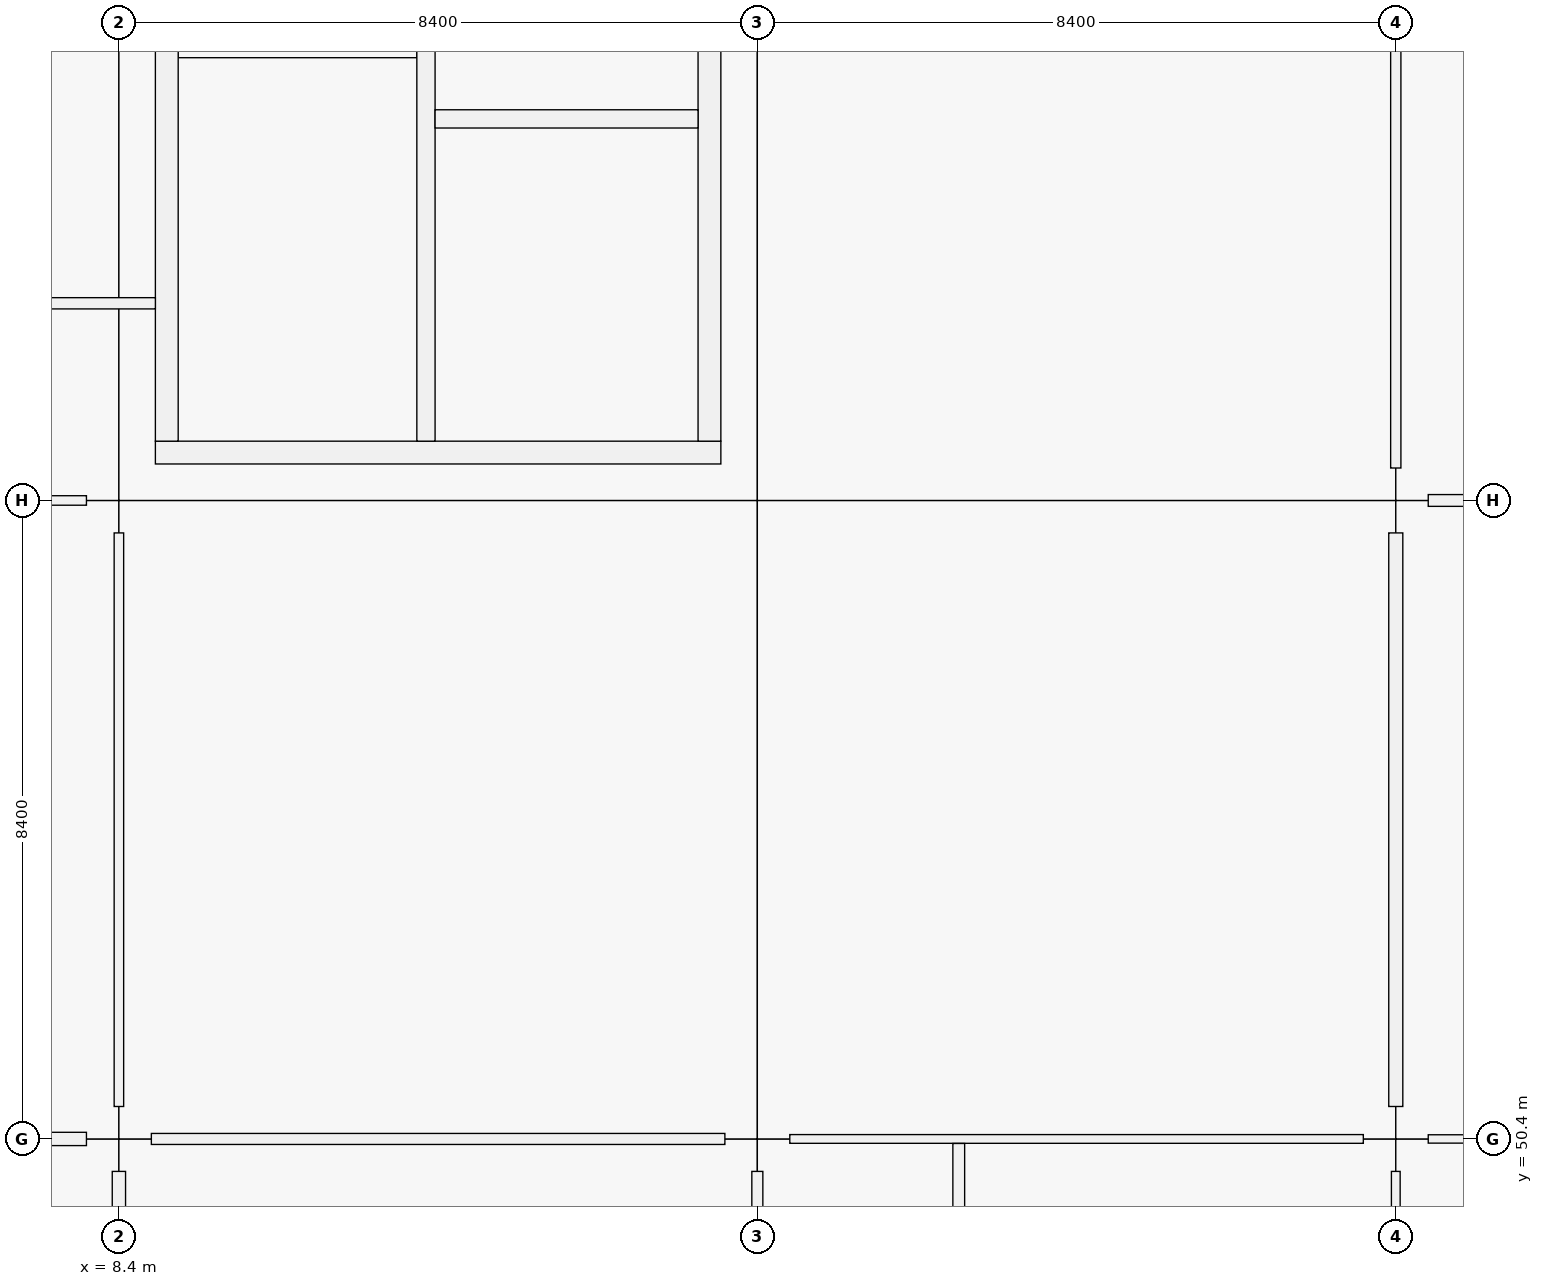
"""IFC4 building model, lengths in metres.
Left out: names, types, materials, properties, quantities, classifications, styles, units other than length and angle.
Written with IfcOpenShell. Run it as: python <this file> out.ifc"""

import sys

from ifc_helpers import new_model, si_unit, direction, frame, frame_2d, origin, origin_2d, place, context, subcontext, project, spatial, rectangle, extrude, element, fill, save


model = new_model("IFC4")
c1 = context("Model", 3, precision=1e-05, world=origin(), true_north=direction((0.0, 1.0)))
c2 = subcontext(c1, "Body", "Model", "MODEL_VIEW")
j1 = project(units=[si_unit("LENGTHUNIT", "METRE"), si_unit("PLANEANGLEUNIT", "RADIAN")], contexts=[c1])
p1 = place(None, origin())
s1 = spatial("IfcSite", under=j1, at=p1, CompositionType="ELEMENT")
p2 = place(p1, origin())
s2 = spatial("IfcBuilding", under=s1, at=p2, CompositionType="ELEMENT")
p3 = place(p2, origin())
s3 = spatial("IfcBuildingStorey", under=s2, at=p3, CompositionType="ELEMENT", Elevation=0.0)
for number, where, z_axis, x_axis in (
    (1, (8.4, 50.4, 0.0), (0.0, 0.0, 1.0), (1.0, 0.0, 0.0)),
    (2, (8.4, 58.8, 0.0), (0.0, 0.0, 1.0), (1.0, 0.0, 0.0)),
    (3, (16.8, 50.4, 0.0), (0.0, 0.0, 1.0), (1.0, 0.0, 0.0)),
    (4, (16.8, 58.8, 0.0), (0.0, 0.0, 1.0), (1.0, 0.0, 0.0)),
    (5, (25.2, 50.4, 0.0), (0.0, 0.0, 1.0), (1.0, 0.0, 0.0)),
    (6, (25.2, 58.8, 0.0), (0.0, 0.0, 1.0), (1.0, 0.0, 0.0)),
):
    element("IfcColumn", number, at=place(p3, frame(where, z_axis=z_axis, x_axis=x_axis)), inside=s3, PredefinedType="COLUMN", context=c2, shape_type="SweptSolid", body=[
        extrude(rectangle(XDim=0.85, YDim=0.85, at=origin_2d()), origin(), (0.0, 0.0, 1.0), 5.76),
    ])
p4 = place(p3, frame((16.32, 59.43, 0.0), z_axis=(0.0, 0.0, 1.0), x_axis=(-1.0, 0.0, 0.0)))
e7 = element("IfcWall", 7, at=p4, inside=s3, PredefinedType="SHEAR", context=c2, shape_type="SweptSolid", body=[
    extrude(rectangle(XDim=7.44, YDim=0.3, at=frame_2d((3.72, 0.0))), origin(), (0.0, 0.0, 1.0), 5.76),
])
p5 = place(p4, frame((1.28, 0.0, 0.0)))
e8 = element("IfcOpeningElement", 8, at=p5, cuts=e7, PredefinedType="OPENING", context=c2, shape_type="SweptSolid", body=[
    extrude(rectangle(XDim=1.5, YDim=2.15, at=frame_2d((0.75, 1.075))), frame((0.0, 0.15, 0.0), z_axis=(0.0, -1.0, 0.0), x_axis=(1.0, 0.0, 0.0)), (0.0, 0.0, 1.0), 0.3),
])
p6 = place(p3, frame((9.03, 59.58, 0.0), z_axis=(0.0, 0.0, 1.0), x_axis=(0.0, 1.0, 0.0)))
e9 = element("IfcWall", 9, at=p6, inside=s3, PredefinedType="SHEAR", context=c2, shape_type="SweptSolid", body=[
    extrude(rectangle(XDim=6.84, YDim=0.3, at=frame_2d((3.42, 0.0))), origin(), (0.0, 0.0, 1.0), 5.76),
])
p7 = place(p6, frame((0.12, 0.0, 0.0)))
e10 = element("IfcOpeningElement", 10, at=p7, cuts=e9, PredefinedType="OPENING", context=c2, shape_type="SweptSolid", body=[
    extrude(rectangle(XDim=1.0, YDim=2.15, at=frame_2d((0.5, 1.075))), frame((0.0, 0.15, 0.0), z_axis=(0.0, -1.0, 0.0), x_axis=(1.0, 0.0, 0.0)), (0.0, 0.0, 1.0), 0.3),
])
p8 = place(p3, frame((16.17, 66.42, 0.0), z_axis=(0.0, 0.0, 1.0), x_axis=(0.0, -1.0, 0.0)))
e11 = element("IfcWall", 11, at=p8, inside=s3, PredefinedType="SHEAR", context=c2, shape_type="SweptSolid", body=[
    extrude(rectangle(XDim=6.84, YDim=0.3, at=frame_2d((3.42, 0.0))), origin(), (0.0, 0.0, 1.0), 5.76),
])
p9 = place(p3, frame((12.44, 59.58, 0.0), z_axis=(0.0, 0.0, 1.0), x_axis=(0.0, 1.0, 0.0)))
e12 = element("IfcWall", 12, at=p9, inside=s3, PredefinedType="SHEAR", context=c2, shape_type="SweptSolid", body=[
    extrude(rectangle(XDim=6.84, YDim=0.24, at=frame_2d((3.42, 0.0))), origin(), (0.0, 0.0, 1.0), 5.76),
])
p10 = place(p9, frame((0.12, 0.0, 0.0)))
e13 = element("IfcOpeningElement", 13, at=p10, cuts=e12, PredefinedType="OPENING", context=c2, shape_type="SweptSolid", body=[
    extrude(rectangle(XDim=1.0, YDim=2.15, at=frame_2d((0.5, 1.075))), frame((0.0, 0.12, 0.0), z_axis=(0.0, -1.0, 0.0), x_axis=(1.0, 0.0, 0.0)), (0.0, 0.0, 1.0), 0.24),
])
p11 = place(p3, frame((12.56, 63.82, 0.0), z_axis=(0.0, 0.0, 1.0), x_axis=(1.0, 0.0, 0.0)))
e14 = element("IfcWall", 14, at=p11, inside=s3, PredefinedType="SHEAR", context=c2, shape_type="SweptSolid", body=[
    extrude(rectangle(XDim=3.46, YDim=0.24, at=frame_2d((1.73, 0.0))), origin(), (0.0, 0.0, 1.0), 5.76),
])
p12 = place(p11, frame((1.18, 0.0, 0.0)))
e15 = element("IfcOpeningElement", 15, at=p12, cuts=e14, PredefinedType="OPENING", context=c2, shape_type="SweptSolid", body=[
    extrude(rectangle(XDim=1.1, YDim=2.15, at=frame_2d((0.55, 1.075))), frame((0.0, 0.12, 0.0), z_axis=(0.0, -1.0, 0.0), x_axis=(1.0, 0.0, 0.0)), (0.0, 0.0, 1.0), 0.24),
])
p13 = place(p3, frame((0.327, 50.4, 0.0), z_axis=(0.0, 0.0, 1.0), x_axis=(1.0, 0.0, 0.0)))
e16 = element("IfcWall", 16, at=p13, inside=s3, PredefinedType="PARTITIONING", context=c2, shape_type="SweptSolid", body=[
    extrude(rectangle(XDim=7.646, YDim=0.175, at=frame_2d((3.823, 0.0))), origin(), (0.0, 0.0, 1.0), 3.66),
])
p14 = place(p13, frame((3.318, 0.0, 0.0)))
e17 = element("IfcOpeningElement", 17, at=p14, cuts=e16, PredefinedType="OPENING", context=c2, shape_type="SweptSolid", body=[
    extrude(rectangle(XDim=1.01, YDim=2.12, at=frame_2d((0.505, 1.06))), frame((0.0, 0.087, 0.0), z_axis=(0.0, -1.0, 0.0), x_axis=(1.0, 0.0, 0.0)), (0.0, 0.0, 1.0), 0.175),
])
p15 = place(p3, frame((0.302, 58.8, 0.0), z_axis=(0.0, 0.0, 1.0), x_axis=(1.0, 0.0, 0.0)))
e18 = element("IfcWall", 18, at=p15, inside=s3, PredefinedType="PARTITIONING", context=c2, shape_type="SweptSolid", body=[
    extrude(rectangle(XDim=7.671, YDim=0.125, at=frame_2d((3.835, 0.0))), origin(), (0.0, 0.0, 1.0), 3.66),
])
p16 = place(p15, frame((3.316, 0.0, 0.0)))
e19 = element("IfcOpeningElement", 19, at=p16, cuts=e18, PredefinedType="OPENING", context=c2, shape_type="SweptSolid", body=[
    extrude(rectangle(XDim=1.04, YDim=2.2, at=frame_2d((0.52, 1.1))), frame((0.0, 0.062, 0.0), z_axis=(0.0, -1.0, 0.0), x_axis=(1.0, 0.0, 0.0)), (0.0, 0.0, 1.0), 0.125),
])
p17 = place(p3, frame((8.827, 50.4, 0.0), z_axis=(0.0, 0.0, 1.0), x_axis=(1.0, 0.0, 0.0)))
e20 = element("IfcWall", 20, at=p17, inside=s3, PredefinedType="PARTITIONING", context=c2, shape_type="SweptSolid", body=[
    extrude(rectangle(XDim=7.546, YDim=0.145, at=frame_2d((3.773, 0.0))), origin(), (0.0, 0.0, 1.0), 3.66),
])
p18 = place(p17, frame((3.263, 0.0, 0.0)))
e21 = element("IfcOpeningElement", 21, at=p18, cuts=e20, PredefinedType="OPENING", context=c2, shape_type="SweptSolid", body=[
    extrude(rectangle(XDim=1.02, YDim=2.2, at=frame_2d((0.51, 1.1))), frame((0.0, 0.073, 0.0), z_axis=(0.0, -1.0, 0.0), x_axis=(1.0, 0.0, 0.0)), (0.0, 0.0, 1.0), 0.145),
])
p19 = place(p3, frame((17.227, 50.4, 0.0), z_axis=(0.0, 0.0, 1.0), x_axis=(1.0, 0.0, 0.0)))
e22 = element("IfcWall", 22, at=p19, inside=s3, PredefinedType="PARTITIONING", context=c2, shape_type="SweptSolid", body=[
    extrude(rectangle(XDim=7.546, YDim=0.115, at=frame_2d((3.773, 0.0))), origin(), (0.0, 0.0, 1.0), 3.66),
])
p20 = place(p19, frame((0.578, 0.0, 0.0)))
e23 = element("IfcOpeningElement", 23, at=p20, cuts=e22, PredefinedType="OPENING", context=c2, shape_type="SweptSolid", body=[
    extrude(rectangle(XDim=0.92, YDim=2.1, at=frame_2d((0.46, 1.05))), frame((0.0, 0.058, 0.0), z_axis=(0.0, -1.0, 0.0), x_axis=(1.0, 0.0, 0.0)), (0.0, 0.0, 1.0), 0.115),
])
p21 = place(p19, frame((4.468, 0.0, 0.0)))
e24 = element("IfcOpeningElement", 24, at=p21, cuts=e22, PredefinedType="OPENING", context=c2, shape_type="SweptSolid", body=[
    extrude(rectangle(XDim=0.98, YDim=2.08, at=frame_2d((0.49, 1.04))), frame((0.0, 0.058, 0.0), z_axis=(0.0, -1.0, 0.0), x_axis=(1.0, 0.0, 0.0)), (0.0, 0.0, 1.0), 0.115),
])
p22 = place(p3, frame((25.627, 50.4, 0.0), z_axis=(0.0, 0.0, 1.0), x_axis=(1.0, 0.0, 0.0)))
e25 = element("IfcWall", 25, at=p22, inside=s3, PredefinedType="MOVABLE", context=c2, shape_type="SweptSolid", body=[
    extrude(rectangle(XDim=7.546, YDim=0.11, at=frame_2d((3.773, 0.0))), origin(), (0.0, 0.0, 1.0), 3.66),
])
p23 = place(p22, frame((3.233, 0.0, 0.0)))
e26 = element("IfcOpeningElement", 26, at=p23, cuts=e25, PredefinedType="OPENING", context=c2, shape_type="SweptSolid", body=[
    extrude(rectangle(XDim=1.08, YDim=2.25, at=frame_2d((0.54, 1.125))), frame((0.0, 0.055, 0.0), z_axis=(0.0, -1.0, 0.0), x_axis=(1.0, 0.0, 0.0)), (0.0, 0.0, 1.0), 0.11),
])
p24 = place(p3, frame((25.627, 58.8, 0.0), z_axis=(0.0, 0.0, 1.0), x_axis=(1.0, 0.0, 0.0)))
e27 = element("IfcWall", 27, at=p24, inside=s3, PredefinedType="PARTITIONING", context=c2, shape_type="SweptSolid", body=[
    extrude(rectangle(XDim=7.546, YDim=0.155, at=frame_2d((3.773, 0.0))), origin(), (0.0, 0.0, 1.0), 3.66),
])
p25 = place(p24, frame((3.243, 0.0, 0.0)))
e28 = element("IfcOpeningElement", 28, at=p25, cuts=e27, PredefinedType="OPENING", context=c2, shape_type="SweptSolid", body=[
    extrude(rectangle(XDim=1.06, YDim=2.25, at=frame_2d((0.53, 1.125))), frame((0.0, 0.078, 0.0), z_axis=(0.0, -1.0, 0.0), x_axis=(1.0, 0.0, 0.0)), (0.0, 0.0, 1.0), 0.155),
])
p26 = place(p3, frame((8.4, 42.427, 0.0), z_axis=(0.0, 0.0, 1.0), x_axis=(0.0, 1.0, 0.0)))
e29 = element("IfcWall", 29, at=p26, inside=s3, PredefinedType="PARTITIONING", context=c2, shape_type="SweptSolid", body=[
    extrude(rectangle(XDim=7.546, YDim=0.175, at=frame_2d((3.773, 0.0))), origin(), (0.0, 0.0, 1.0), 3.66),
])
p27 = place(p26, frame((3.303, 0.0, 0.0)))
e30 = element("IfcOpeningElement", 30, at=p27, cuts=e29, PredefinedType="OPENING", context=c2, shape_type="SweptSolid", body=[
    extrude(rectangle(XDim=0.94, YDim=2.15, at=frame_2d((0.47, 1.075))), frame((0.0, 0.087, 0.0), z_axis=(0.0, -1.0, 0.0), x_axis=(1.0, 0.0, 0.0)), (0.0, 0.0, 1.0), 0.175),
])
p28 = place(p3, frame((8.4, 50.827, 0.0), z_axis=(0.0, 0.0, 1.0), x_axis=(0.0, 1.0, 0.0)))
e31 = element("IfcWall", 31, at=p28, inside=s3, PredefinedType="PARTITIONING", context=c2, shape_type="SweptSolid", body=[
    extrude(rectangle(XDim=7.546, YDim=0.125, at=frame_2d((3.773, 0.0))), origin(), (0.0, 0.0, 1.0), 3.66),
])
p29 = place(p28, frame((3.263, 0.0, 0.0)))
e32 = element("IfcOpeningElement", 32, at=p29, cuts=e31, PredefinedType="OPENING", context=c2, shape_type="SweptSolid", body=[
    extrude(rectangle(XDim=1.02, YDim=2.2, at=frame_2d((0.51, 1.1))), frame((0.0, 0.062, 0.0), z_axis=(0.0, -1.0, 0.0), x_axis=(1.0, 0.0, 0.0)), (0.0, 0.0, 1.0), 0.125),
])
p30 = place(p3, frame((16.8, 42.427, 0.0), z_axis=(0.0, 0.0, 1.0), x_axis=(0.0, 1.0, 0.0)))
e33 = element("IfcWall", 33, at=p30, inside=s3, PredefinedType="PARTITIONING", context=c2, shape_type="SweptSolid", body=[
    extrude(rectangle(XDim=7.546, YDim=0.145, at=frame_2d((3.773, 0.0))), origin(), (0.0, 0.0, 1.0), 3.66),
])
p31 = place(p3, frame((25.2, 42.427, 0.0), z_axis=(0.0, 0.0, 1.0), x_axis=(0.0, 1.0, 0.0)))
e34 = element("IfcWall", 34, at=p31, inside=s3, PredefinedType="PARTITIONING", context=c2, shape_type="SweptSolid", body=[
    extrude(rectangle(XDim=7.546, YDim=0.115, at=frame_2d((3.773, 0.0))), origin(), (0.0, 0.0, 1.0), 3.66),
])
p32 = place(p3, frame((25.2, 50.827, 0.0), z_axis=(0.0, 0.0, 1.0), x_axis=(0.0, 1.0, 0.0)))
e35 = element("IfcWall", 35, at=p32, inside=s3, PredefinedType="PARTITIONING", context=c2, shape_type="SweptSolid", body=[
    extrude(rectangle(XDim=7.546, YDim=0.185, at=frame_2d((3.773, 0.0))), origin(), (0.0, 0.0, 1.0), 3.66),
])
p33 = place(p32, frame((3.303, 0.0, 0.0)))
e36 = element("IfcOpeningElement", 36, at=p33, cuts=e35, PredefinedType="OPENING", context=c2, shape_type="SweptSolid", body=[
    extrude(rectangle(XDim=0.94, YDim=2.15, at=frame_2d((0.47, 1.075))), frame((0.0, 0.093, 0.0), z_axis=(0.0, -1.0, 0.0), x_axis=(1.0, 0.0, 0.0)), (0.0, 0.0, 1.0), 0.185),
])
p34 = place(p3, frame((25.2, 59.227, 0.0), z_axis=(0.0, 0.0, 1.0), x_axis=(0.0, 1.0, 0.0)))
e37 = element("IfcWall", 37, at=p34, inside=s3, PredefinedType="PARTITIONING", context=c2, shape_type="SweptSolid", body=[
    extrude(rectangle(XDim=7.546, YDim=0.135, at=frame_2d((3.773, 0.0))), origin(), (0.0, 0.0, 1.0), 3.66),
])
p35 = place(p34, frame((3.313, 0.0, 0.0)))
e38 = element("IfcOpeningElement", 38, at=p35, cuts=e37, PredefinedType="OPENING", context=c2, shape_type="SweptSolid", body=[
    extrude(rectangle(XDim=0.92, YDim=2.15, at=frame_2d((0.46, 1.075))), frame((0.0, 0.067, 0.0), z_axis=(0.0, -1.0, 0.0), x_axis=(1.0, 0.0, 0.0)), (0.0, 0.0, 1.0), 0.135),
])
p36 = place(p3, frame((19.45, 42.084, 0.0), z_axis=(0.0, 0.0, 1.0), x_axis=(0.0, 1.0, 0.0)))
e39 = element("IfcWall", 39, at=p36, inside=s3, PredefinedType="PARTITIONING", context=c2, shape_type="SweptSolid", body=[
    extrude(rectangle(XDim=8.256, YDim=0.155, at=frame_2d((4.128, 0.0))), origin(), (0.0, 0.0, 1.0), 3.66),
])
p37 = place(p3, frame((0.16, 61.394, 0.0), z_axis=(0.0, 0.0, 1.0), x_axis=(1.0, 0.0, 0.0)))
e40 = element("IfcWall", 40, at=p37, inside=s3, PredefinedType="PARTITIONING", context=c2, shape_type="SweptSolid", body=[
    extrude(rectangle(XDim=8.72, YDim=0.148, at=frame_2d((4.36, 0.0))), origin(), (0.0, 0.0, 1.0), 3.66),
])
p38 = place(p10, origin())
e41 = element("IfcDoor", 41, at=p38, inside=s3, OperationType="SINGLE_SWING_LEFT", PredefinedType="DOOR", context=c2, shape_type="SweptSolid", body=[
    extrude(rectangle(XDim=1.0, YDim=2.15, at=frame_2d((0.5, 1.075))), frame((0.0, 0.025, 0.0), z_axis=(0.0, -1.0, 0.0), x_axis=(1.0, 0.0, 0.0)), (0.0, 0.0, 1.0), 0.05),
])
fill(e13, e41)
p39 = place(p5, origin())
e42 = element("IfcDoor", 42, at=p39, inside=s3, OperationType="DOUBLE_DOOR_SINGLE_SWING", PredefinedType="DOOR", context=c2, shape_type="SweptSolid", body=[
    extrude(rectangle(XDim=1.5, YDim=2.15, at=frame_2d((0.75, 1.075))), frame((0.0, 0.025, 0.0), z_axis=(0.0, -1.0, 0.0), x_axis=(1.0, 0.0, 0.0)), (0.0, 0.0, 1.0), 0.05),
])
fill(e8, e42)
p40 = place(p7, origin())
e43 = element("IfcDoor", 43, at=p40, inside=s3, OperationType="SINGLE_SWING_RIGHT", PredefinedType="DOOR", context=c2, shape_type="SweptSolid", body=[
    extrude(rectangle(XDim=1.0, YDim=2.15, at=frame_2d((0.5, 1.075))), frame((0.0, 0.025, 0.0), z_axis=(0.0, -1.0, 0.0), x_axis=(1.0, 0.0, 0.0)), (0.0, 0.0, 1.0), 0.05),
])
fill(e10, e43)
p41 = place(p12, origin())
e44 = element("IfcDoor", 44, at=p41, inside=s3, OperationType="DOUBLE_DOOR_SLIDING", PredefinedType="DOOR", context=c2, shape_type="SweptSolid", body=[
    extrude(rectangle(XDim=1.1, YDim=2.15, at=frame_2d((0.55, 1.075))), frame((0.0, 0.025, 0.0), z_axis=(0.0, -1.0, 0.0), x_axis=(1.0, 0.0, 0.0)), (0.0, 0.0, 1.0), 0.05),
])
fill(e15, e44)
p42 = place(p20, origin())
e45 = element("IfcDoor", 45, at=p42, inside=s3, OperationType="SINGLE_SWING_LEFT", PredefinedType="DOOR", context=c2, shape_type="SweptSolid", body=[
    extrude(rectangle(XDim=0.92, YDim=2.1, at=frame_2d((0.46, 1.05))), frame((0.0, 0.025, 0.0), z_axis=(0.0, -1.0, 0.0), x_axis=(1.0, 0.0, 0.0)), (0.0, 0.0, 1.0), 0.05),
])
fill(e23, e45)
p43 = place(p21, origin())
e46 = element("IfcDoor", 46, at=p43, inside=s3, OperationType="SINGLE_SWING_RIGHT", PredefinedType="DOOR", context=c2, shape_type="SweptSolid", body=[
    extrude(rectangle(XDim=0.98, YDim=2.08, at=frame_2d((0.49, 1.04))), frame((0.0, 0.025, 0.0), z_axis=(0.0, -1.0, 0.0), x_axis=(1.0, 0.0, 0.0)), (0.0, 0.0, 1.0), 0.05),
])
fill(e24, e46)
p44 = place(p18, origin())
e47 = element("IfcDoor", 47, at=p44, inside=s3, OperationType="SINGLE_SWING_RIGHT", PredefinedType="DOOR", context=c2, shape_type="SweptSolid", body=[
    extrude(rectangle(XDim=1.02, YDim=2.2, at=frame_2d((0.51, 1.1))), frame((0.0, 0.025, 0.0), z_axis=(0.0, -1.0, 0.0), x_axis=(1.0, 0.0, 0.0)), (0.0, 0.0, 1.0), 0.05),
])
fill(e21, e47)
p45 = place(p29, origin())
e48 = element("IfcDoor", 48, at=p45, inside=s3, OperationType="SINGLE_SWING_LEFT", PredefinedType="DOOR", context=c2, shape_type="SweptSolid", body=[
    extrude(rectangle(XDim=1.02, YDim=2.2, at=frame_2d((0.51, 1.1))), frame((0.0, 0.025, 0.0), z_axis=(0.0, -1.0, 0.0), x_axis=(1.0, 0.0, 0.0)), (0.0, 0.0, 1.0), 0.05),
])
fill(e32, e48)
p46 = place(p33, origin())
e49 = element("IfcDoor", 49, at=p46, inside=s3, OperationType="SINGLE_SWING_LEFT", PredefinedType="DOOR", context=c2, shape_type="SweptSolid", body=[
    extrude(rectangle(XDim=0.94, YDim=2.15, at=frame_2d((0.47, 1.075))), frame((0.0, 0.025, 0.0), z_axis=(0.0, -1.0, 0.0), x_axis=(1.0, 0.0, 0.0)), (0.0, 0.0, 1.0), 0.05),
])
fill(e36, e49)
p47 = place(p35, origin())
e50 = element("IfcDoor", 50, at=p47, inside=s3, OperationType="SINGLE_SWING_RIGHT", PredefinedType="DOOR", context=c2, shape_type="SweptSolid", body=[
    extrude(rectangle(XDim=0.92, YDim=2.15, at=frame_2d((0.46, 1.075))), frame((0.0, 0.025, 0.0), z_axis=(0.0, -1.0, 0.0), x_axis=(1.0, 0.0, 0.0)), (0.0, 0.0, 1.0), 0.05),
])
fill(e38, e50)
save(model, sys.argv[1])
